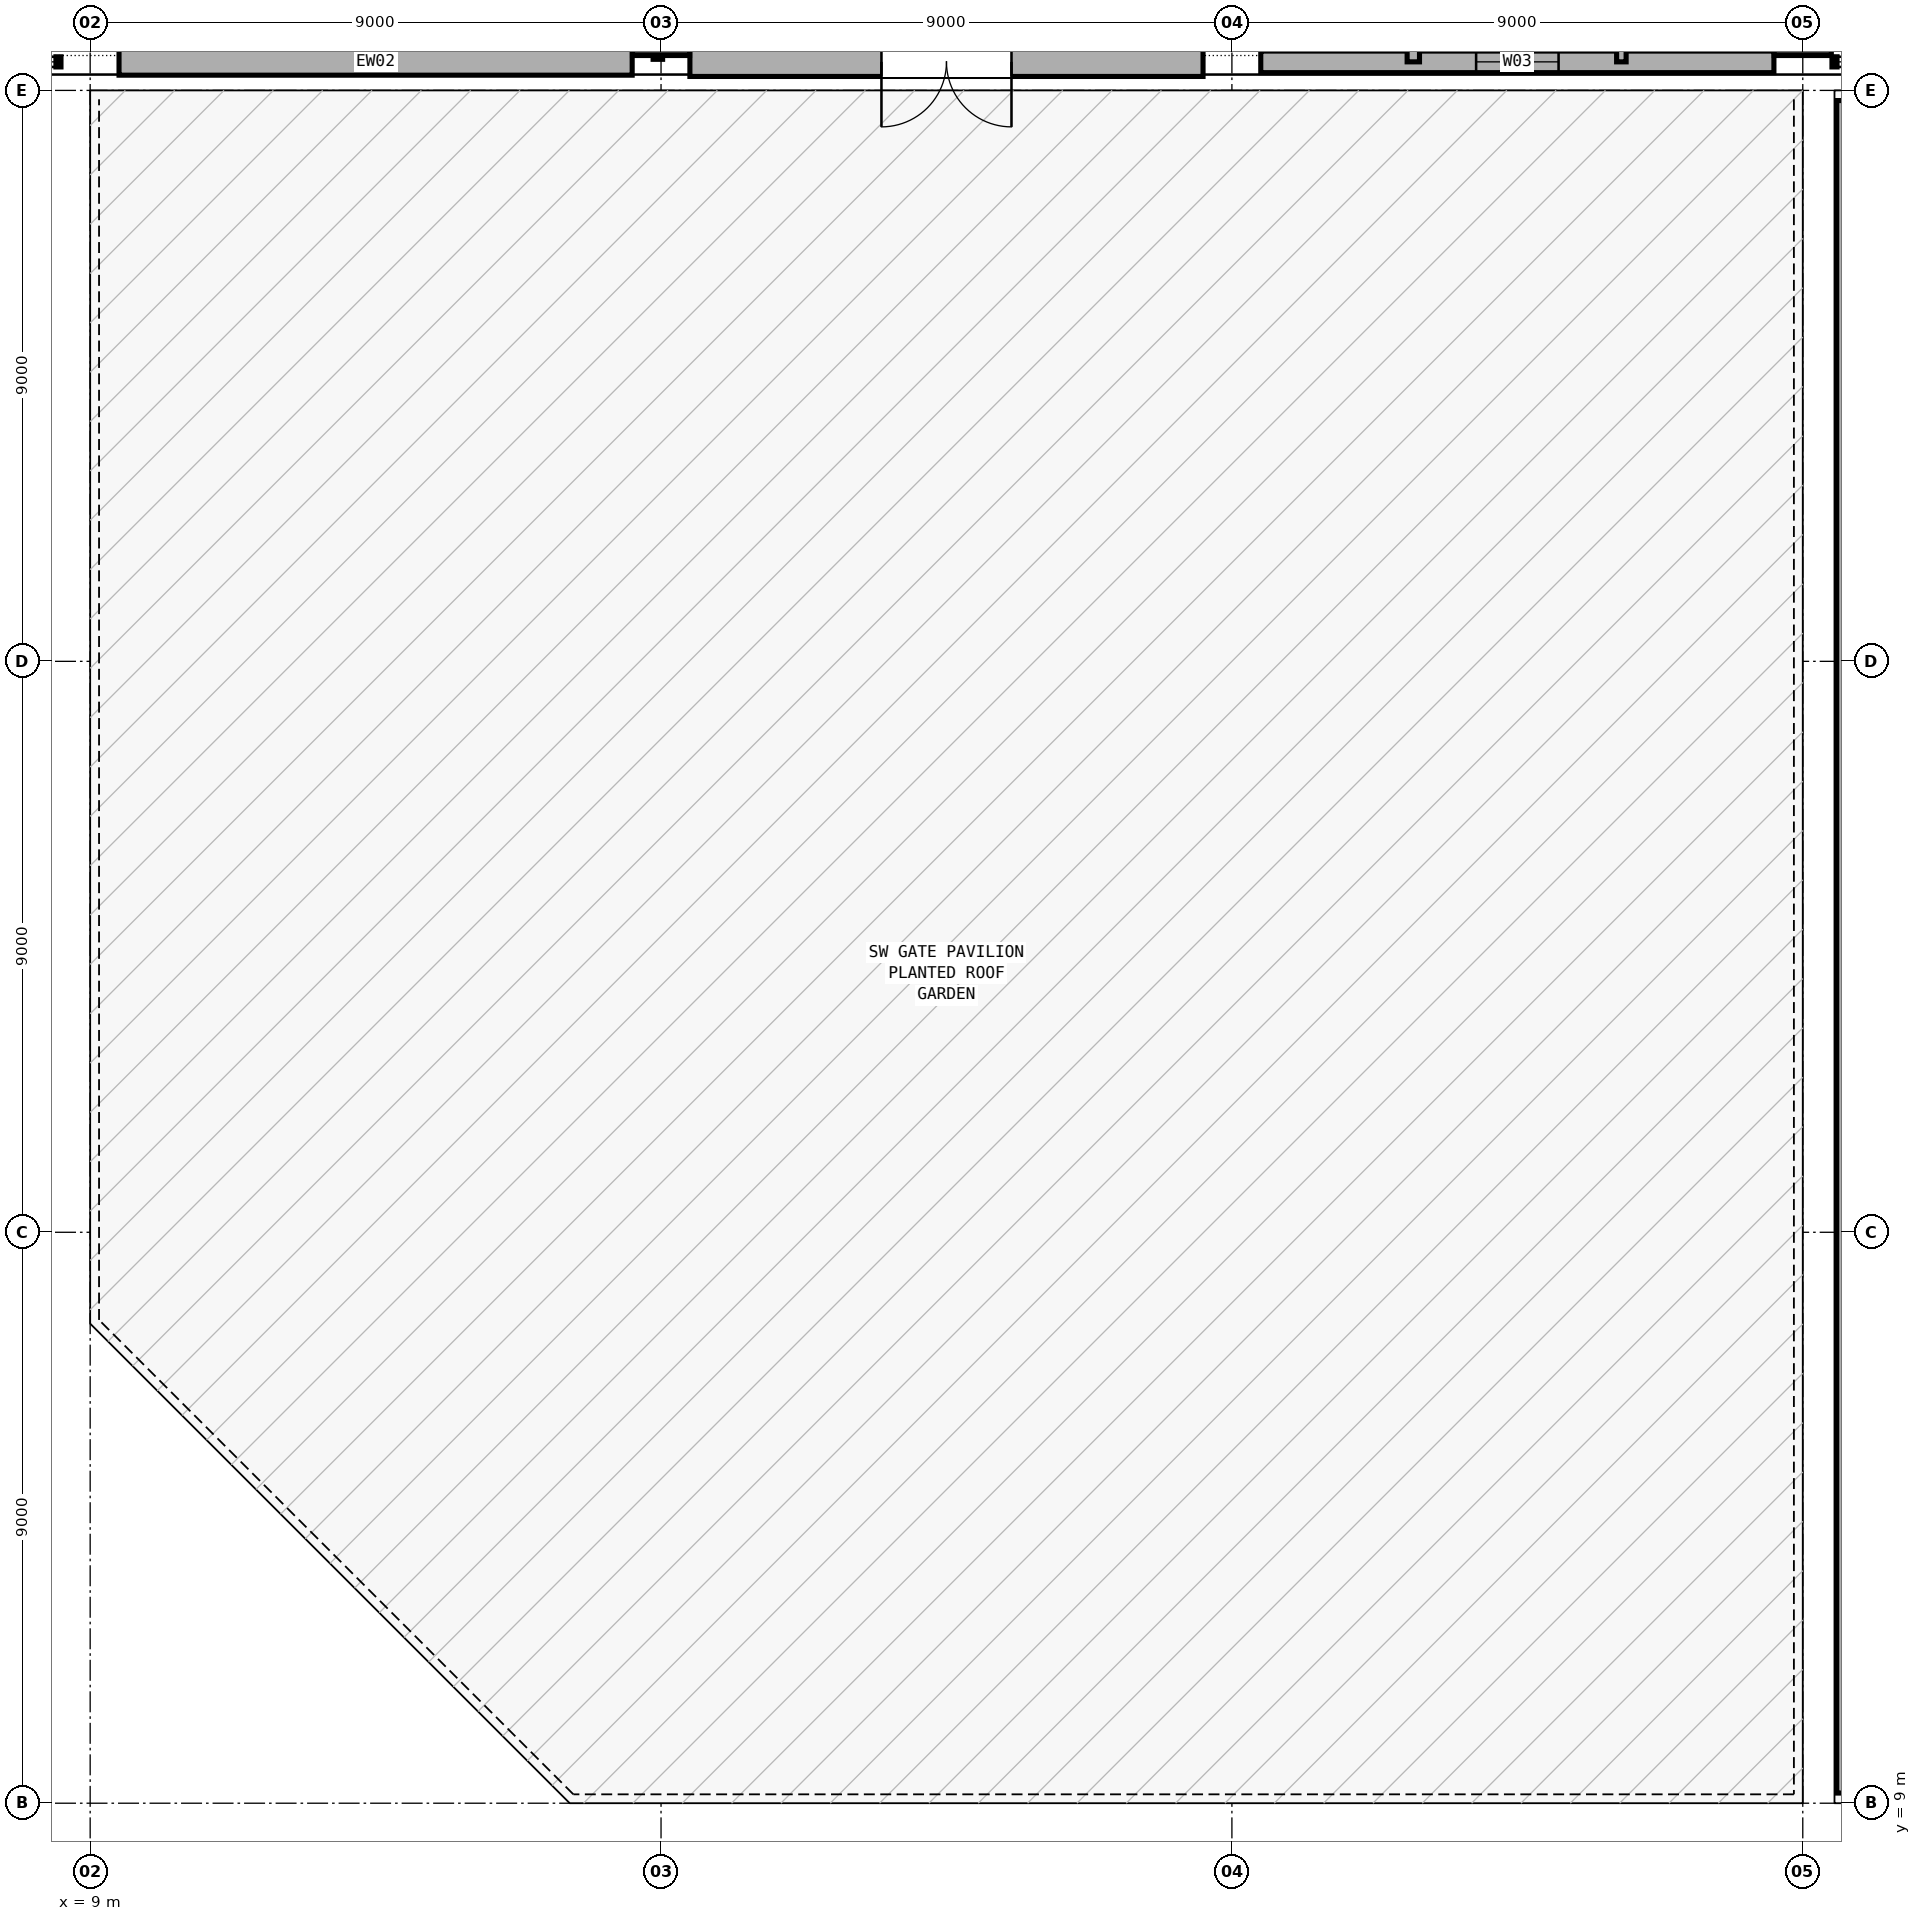
"""IFC4 building model, lengths in metres.
Left out: names, types, materials, properties, quantities, classifications, styles, units other than length and angle.
Written with IfcOpenShell. Run it as: python <this file> out.ifc"""

import sys

from ifc_helpers import new_model, si_unit, direction, frame, frame_2d, origin, origin_2d, place, context, subcontext, project, spatial, rectangle, extrude, element, fill, save


model = new_model("IFC4")
c1 = context("Model", 3, precision=1e-05, world=origin(), true_north=direction((0.0, 1.0)))
c2 = subcontext(c1, "Body", "Model", "MODEL_VIEW")
j1 = project(units=[si_unit("LENGTHUNIT", "METRE"), si_unit("PLANEANGLEUNIT", "RADIAN")], contexts=[c1])
p1 = place(None, origin())
s1 = spatial("IfcSite", under=j1, at=p1, CompositionType="ELEMENT")
p2 = place(p1, origin())
s2 = spatial("IfcBuilding", under=s1, at=p2, CompositionType="ELEMENT")
p3 = place(p2, frame((0.0, 0.0, 14.4)))
s3 = spatial("IfcBuildingStorey", under=s2, at=p3, CompositionType="ELEMENT", Elevation=14.4)
for number, where, z_axis, x_axis in (
    (1, (18.0, 37.1, 0.0), (0.0, 0.0, 1.0), (1.0, 0.0, 0.0)),
    (2, (36.0, 37.1, 0.0), (0.0, 0.0, 1.0), (1.0, 0.0, 0.0)),
):
    element("IfcColumn", number, at=place(p3, frame(where, z_axis=z_axis, x_axis=x_axis)), inside=s3, PredefinedType="COLUMN", context=c2, shape_type="SweptSolid", body=[
        extrude(rectangle(XDim=0.9, YDim=1.1, at=origin_2d()), origin(), (0.0, 0.0, 1.0), 4.8),
    ])
p4 = place(p3, frame((35.545, 36.45, 0.0), z_axis=(0.0, 0.0, 1.0), x_axis=(-1.0, 0.0, 0.0)))
e3 = element("IfcWall", 3, at=p4, inside=s3, PredefinedType="SOLIDWALL", context=c2, shape_type="SweptSolid", body=[
    extrude(rectangle(XDim=8.09, YDim=0.34, at=frame_2d((4.045, 0.0))), origin(), (0.0, 0.0, 1.0), 3.58),
])
p5 = place(p4, frame((3.395, 0.0, 0.9)))
e4 = element("IfcOpeningElement", 4, at=p5, cuts=e3, PredefinedType="OPENING", context=c2, shape_type="SweptSolid", body=[
    extrude(rectangle(XDim=1.3, YDim=1.5, at=frame_2d((0.65, 0.75))), frame((0.0, 0.18, 0.0), z_axis=(0.0, -1.0, 0.0), x_axis=(1.0, 0.0, 0.0)), (0.0, 0.0, 1.0), 0.36),
])
p6 = place(p3, frame((26.545, 36.45, 0.0), z_axis=(0.0, 0.0, 1.0), x_axis=(-1.0, 0.0, 0.0)))
e5 = element("IfcWall", 5, at=p6, inside=s3, PredefinedType="SOLIDWALL", context=c2, shape_type="SweptSolid", body=[
    extrude(rectangle(XDim=8.09, YDim=0.46, at=frame_2d((4.045, 0.0))), origin(), (0.0, 0.0, 1.0), 3.58),
])
p7 = place(p6, frame((3.02, 0.0, 0.0)))
e6 = element("IfcOpeningElement", 6, at=p7, cuts=e5, PredefinedType="OPENING", context=c2, shape_type="SweptSolid", body=[
    extrude(rectangle(XDim=2.05, YDim=2.3, at=frame_2d((1.025, 1.15))), frame((0.0, 0.24, 0.0), z_axis=(0.0, -1.0, 0.0), x_axis=(1.0, 0.0, 0.0)), (0.0, 0.0, 1.0), 0.48),
])
p8 = place(p3, frame((17.545, 36.45, 0.0), z_axis=(0.0, 0.0, 1.0), x_axis=(-1.0, 0.0, 0.0)))
e7 = element("IfcWall", 7, at=p8, inside=s3, PredefinedType="SOLIDWALL", context=c2, shape_type="SweptSolid", body=[
    extrude(rectangle(XDim=8.09, YDim=0.42, at=frame_2d((4.045, 0.0))), origin(), (0.0, 0.0, 1.0), 3.58),
])
p9 = place(p3, frame((36.66, 9.16, 0.0), z_axis=(0.0, 0.0, 1.0), x_axis=(0.0, 1.0, 0.0)))
e8 = element("IfcWall", 8, at=p9, inside=s3, PredefinedType="PARAPET", context=c2, shape_type="SweptSolid", body=[
    extrude(rectangle(XDim=26.68, YDim=0.25, at=frame_2d((13.34, 0.0))), origin(), (0.0, 0.0, 1.0), 0.65),
])
p10 = place(p3, frame((17.95, 53.198, 0.0), z_axis=(0.0, 0.0, 1.0), x_axis=(0.0, -1.0, 0.0)))
e9 = element("IfcWall", 9, at=p10, inside=s3, PredefinedType="PARTITIONING", context=c2, shape_type="SweptSolid", body=[
    extrude(rectangle(XDim=16.708, YDim=0.15, at=frame_2d((8.354, 0.0))), origin(), (0.0, 0.0, 1.0), 3.56),
])
p11 = place(p3, frame((29.86, 36.45, 0.0), z_axis=(0.0, 0.0, 1.0), x_axis=(0.0, 1.0, 0.0)))
e10 = element("IfcWall", 10, at=p11, inside=s3, PredefinedType="PARTITIONING", context=c2, shape_type="SweptSolid", body=[
    extrude(rectangle(XDim=22.78, YDim=0.195, at=frame_2d((11.39, 0.0))), origin(), (0.0, 0.0, 1.0), 3.56),
])
p12 = place(p11, frame((10.69, 0.0, 0.0)))
e11 = element("IfcOpeningElement", 11, at=p12, cuts=e10, PredefinedType="OPENING", context=c2, shape_type="SweptSolid", body=[
    extrude(rectangle(XDim=1.4, YDim=2.15, at=frame_2d((0.7, 1.075))), frame((0.0, 0.107, 0.0), z_axis=(0.0, -1.0, 0.0), x_axis=(1.0, 0.0, 0.0)), (0.0, 0.0, 1.0), 0.215),
])
p13 = place(p3, frame((33.14, 54.342, 0.0), z_axis=(0.0, 0.0, 1.0), x_axis=(0.0, -1.0, 0.0)))
e12 = element("IfcWall", 12, at=p13, inside=s3, PredefinedType="PARTITIONING", context=c2, shape_type="SweptSolid", body=[
    extrude(rectangle(XDim=17.892, YDim=0.15, at=frame_2d((8.946, 0.0))), origin(), (0.0, 0.0, 1.0), 3.56),
])
p14 = place(p13, frame((8.096, 0.0, 0.0)))
e13 = element("IfcOpeningElement", 13, at=p14, cuts=e12, PredefinedType="OPENING", context=c2, shape_type="SweptSolid", body=[
    extrude(rectangle(XDim=1.7, YDim=2.2, at=frame_2d((0.85, 1.1))), frame((0.0, 0.085, 0.0), z_axis=(0.0, -1.0, 0.0), x_axis=(1.0, 0.0, 0.0)), (0.0, 0.0, 1.0), 0.17),
])
p15 = place(p5, origin())
e14 = element("IfcWindow", 14, at=p15, inside=s3, PartitioningType="SINGLE_PANEL", PredefinedType="WINDOW", context=c2, shape_type="SweptSolid", body=[
    extrude(rectangle(XDim=1.3, YDim=1.5, at=frame_2d((0.65, 0.75))), frame((0.0, 0.03, 0.0), z_axis=(0.0, -1.0, 0.0), x_axis=(1.0, 0.0, 0.0)), (0.0, 0.0, 1.0), 0.06),
])
fill(e4, e14)
p16 = place(p7, origin())
e15 = element("IfcDoor", 15, at=p16, inside=s3, OperationType="DOUBLE_DOOR_SINGLE_SWING", PredefinedType="DOOR", context=c2, shape_type="SweptSolid", body=[
    extrude(rectangle(XDim=2.05, YDim=2.3, at=frame_2d((1.025, 1.15))), frame((0.0, 0.025, 0.0), z_axis=(0.0, -1.0, 0.0), x_axis=(1.0, 0.0, 0.0)), (0.0, 0.0, 1.0), 0.05),
])
fill(e6, e15)
save(model, sys.argv[1])
